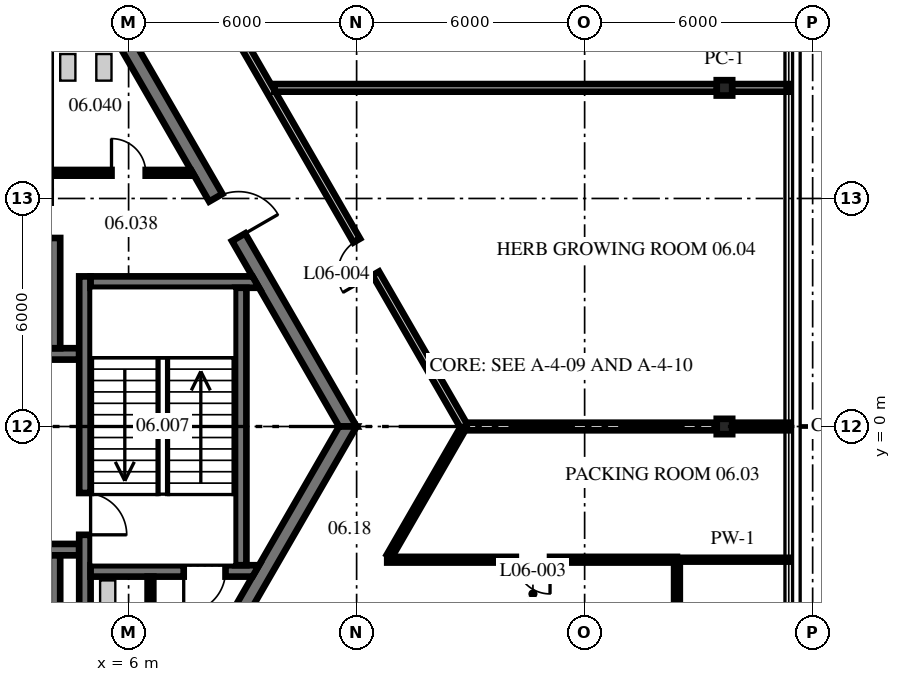
"""IFC4 building model, lengths in metres.
Left out: names, types, materials, properties, quantities, classifications, styles, units other than length and angle.
Written with IfcOpenShell. Run it as: python <this file> out.ifc"""

import sys

from ifc_helpers import new_model, si_unit, direction, frame, frame_2d, origin, origin_2d, place, context, subcontext, project, spatial, polyline, rectangle, i_section, outline, extrude, source, transform, mapped, element, fill, save


model = new_model("IFC4")
c1 = context("Model", 3, precision=1e-05, world=origin(), true_north=direction((0.0, 1.0)))
c2 = subcontext(c1, "Body", "Model", "MODEL_VIEW")
j1 = project(units=[si_unit("LENGTHUNIT", "METRE"), si_unit("PLANEANGLEUNIT", "RADIAN")], contexts=[c1])
p1 = place(None, origin())
s1 = spatial("IfcSite", under=j1, at=p1, CompositionType="ELEMENT")
p2 = place(p1, origin())
s2 = spatial("IfcBuilding", under=s1, at=p2, CompositionType="ELEMENT")
p3 = place(p2, frame((0.0, 0.0, 28.9)))
s3 = spatial("IfcBuildingStorey", under=s2, at=p3, CompositionType="ELEMENT", Elevation=28.9)
m1 = source(origin(), c2, "Body", "SweptSolid", [
    extrude(i_section(OverallWidth=0.404, OverallDepth=0.406, WebThickness=0.027, FlangeThickness=0.044, at=origin_2d()), origin(), (0.0, 0.0, 1.0), 4.3),
])
for number, where, z_axis, x_axis in (
    (1, (21.679, 0.0, 0.0), (0.0, 0.0, 1.0), (0.0, 1.0, 0.0)),
    (2, (21.679, 8.91, 0.0), (0.0, 0.0, 1.0), (0.0, 1.0, 0.0)),
):
    element("IfcColumn", number, at=place(p3, frame(where, z_axis=z_axis, x_axis=x_axis)), inside=s3, PredefinedType="COLUMN", context=c2, shape_type="MappedRepresentation", body=[
        mapped(m1, transform((0.0, 0.0, 0.0), scale=1.0)),
    ])
m2 = source(origin(), c2, "Body", "SweptSolid", [
    extrude(outline(polyline([(-0.115, -0.2), (11.885, -0.2), (11.654, 0.2), (0.115, 0.2), (-0.115, -0.2)])), origin(), (0.0, 0.0, 1.0), 4.1),
])
p4 = place(p3, frame((11.769, 0.0, 0.0), z_axis=(0.0, 0.0, 1.0), x_axis=(-0.499996592174, 0.866027371285, 0.0)))
e3 = element("IfcWall", 3, at=p4, inside=s3, PredefinedType="SHEAR", context=c2, shape_type="MappedRepresentation", body=[
    mapped(m2, transform((0.0, 0.0, 0.0), scale=1.0)),
])
p5 = place(p4, frame((5.75, 0.0, 0.0)))
e4 = element("IfcOpeningElement", 4, at=p5, cuts=e3, PredefinedType="OPENING", context=c2, shape_type="SweptSolid", body=[
    extrude(rectangle(XDim=1.2, YDim=2.1, at=frame_2d((0.6, 1.05))), frame((0.0, 0.21, 0.0), z_axis=(0.0, -1.0, 0.0), x_axis=(1.0, 0.0, 0.0)), (0.0, 0.0, 1.0), 0.42),
])
p6 = place(p3, frame((5.885, -10.192, 0.0), z_axis=(0.0, 0.0, 1.0), x_axis=(0.499996592174, 0.866027371285, 0.0)))
e5 = element("IfcWall", 5, at=p6, inside=s3, PredefinedType="SHEAR", context=c2, shape_type="MappedRepresentation", body=[
    mapped(m2, transform((0.0, 0.0, 0.0), scale=1.0)),
])
p7 = place(p6, frame((3.665, 0.0, 0.0)))
e6 = element("IfcOpeningElement", 6, at=p7, cuts=e5, PredefinedType="OPENING", context=c2, shape_type="SweptSolid", body=[
    extrude(rectangle(XDim=1.2, YDim=2.1, at=frame_2d((0.6, 1.05))), frame((0.0, 0.21, 0.0), z_axis=(0.0, -1.0, 0.0), x_axis=(1.0, 0.0, 0.0)), (0.0, 0.0, 1.0), 0.42),
])
m3 = source(origin(), c2, "Body", "SweptSolid", [
    extrude(rectangle(XDim=3.0, YDim=0.3, at=frame_2d((1.5, 0.0))), origin(), (0.0, 0.0, 1.0), 4.1),
])
p8 = place(p3, frame((1.7, 1.91, 0.0), z_axis=(0.0, 0.0, 1.0), x_axis=(1.0, 0.0, 0.0)))
e7 = element("IfcWall", 7, at=p8, inside=s3, PredefinedType="SHEAR", context=c2, shape_type="MappedRepresentation", body=[
    mapped(m3, transform((0.0, 0.0, 0.0), scale=1.0)),
])
p9 = place(p8, frame((0.55, 0.0, 0.0)))
e8 = element("IfcOpeningElement", 8, at=p9, cuts=e7, PredefinedType="OPENING", context=c2, shape_type="SweptSolid", body=[
    extrude(rectangle(XDim=1.1, YDim=2.1, at=frame_2d((0.55, 1.05))), frame((0.0, 0.16, 0.0), z_axis=(0.0, -1.0, 0.0), x_axis=(1.0, 0.0, 0.0)), (0.0, 0.0, 1.0), 0.32),
])
m4 = source(origin(), c2, "Body", "SweptSolid", [
    extrude(rectangle(XDim=2.9, YDim=0.3, at=frame_2d((1.45, 0.0))), origin(), (0.0, 0.0, 1.0), 4.1),
])
p10 = place(p3, frame((4.05, 2.06, 0.0), z_axis=(0.0, 0.0, 1.0), x_axis=(0.0, 1.0, 0.0)))
e9 = element("IfcWall", 9, at=p10, inside=s3, PredefinedType="SHEAR", context=c2, shape_type="MappedRepresentation", body=[
    mapped(m4, transform((0.0, 0.0, 0.0), scale=1.0)),
])
m5 = source(origin(), c2, "Body", "SweptSolid", [
    extrude(rectangle(XDim=12.8, YDim=0.3, at=frame_2d((6.4, 0.0))), origin(), (0.0, 0.0, 1.0), 4.1),
])
p11 = place(p3, frame((-8.1, -3.24, 0.0), z_axis=(0.0, 0.0, 1.0), x_axis=(1.0, 0.0, 0.0)))
e10 = element("IfcWall", 10, at=p11, inside=s3, PredefinedType="SHEAR", context=c2, shape_type="MappedRepresentation", body=[
    mapped(m5, transform((0.0, 0.0, 0.0), scale=1.0)),
])
p12 = place(p11, frame((0.913, 0.0, 0.0)))
e11 = element("IfcOpeningElement", 11, at=p12, cuts=e10, PredefinedType="OPENING", context=c2, shape_type="SweptSolid", body=[
    extrude(rectangle(XDim=0.9, YDim=2.1, at=frame_2d((0.45, 1.05))), frame((0.0, 0.16, 0.0), z_axis=(0.0, -1.0, 0.0), x_axis=(1.0, 0.0, 0.0)), (0.0, 0.0, 1.0), 0.32),
])
p13 = place(p11, frame((3.05, 0.0, 0.0)))
e12 = element("IfcOpeningElement", 12, at=p13, cuts=e10, PredefinedType="OPENING", context=c2, shape_type="SweptSolid", body=[
    extrude(rectangle(XDim=0.9, YDim=2.1, at=frame_2d((0.45, 1.05))), frame((0.0, 0.16, 0.0), z_axis=(0.0, -1.0, 0.0), x_axis=(1.0, 0.0, 0.0)), (0.0, 0.0, 1.0), 0.32),
])
p14 = place(p11, frame((6.587, 0.0, 0.0)))
e13 = element("IfcOpeningElement", 13, at=p14, cuts=e10, PredefinedType="OPENING", context=c2, shape_type="SweptSolid", body=[
    extrude(rectangle(XDim=0.9, YDim=2.1, at=frame_2d((0.45, 1.05))), frame((0.0, 0.16, 0.0), z_axis=(0.0, -1.0, 0.0), x_axis=(1.0, 0.0, 0.0)), (0.0, 0.0, 1.0), 0.32),
])
p15 = place(p11, frame((10.35, 0.0, 0.0)))
e14 = element("IfcOpeningElement", 14, at=p15, cuts=e10, PredefinedType="OPENING", context=c2, shape_type="SweptSolid", body=[
    extrude(rectangle(XDim=1.1, YDim=2.1, at=frame_2d((0.55, 1.05))), frame((0.0, 0.16, 0.0), z_axis=(0.0, -1.0, 0.0), x_axis=(1.0, 0.0, 0.0)), (0.0, 0.0, 1.0), 0.32),
])
m6 = source(origin(), c2, "Body", "SweptSolid", [
    extrude(rectangle(XDim=2.5, YDim=0.3, at=frame_2d((1.25, 0.0))), origin(), (0.0, 0.0, 1.0), 4.1),
])
p16 = place(p3, frame((4.05, -5.89, 0.0), z_axis=(0.0, 0.0, 1.0), x_axis=(0.0, 1.0, 0.0)))
e15 = element("IfcWall", 15, at=p16, inside=s3, PredefinedType="SHEAR", context=c2, shape_type="MappedRepresentation", body=[
    mapped(m6, transform((0.0, 0.0, 0.0), scale=1.0)),
])
m7 = source(origin(), c2, "Body", "SweptSolid", [
    extrude(outline(polyline([(-0.15, -0.15), (9.99, -0.15), (9.99, 0.15), (0.15, 0.15), (-0.15, -0.15)])), origin(), (0.0, 0.0, 1.0), 4.1),
])
p17 = place(p3, frame((4.85, -6.04, 0.0), z_axis=(0.0, 0.0, 1.0), x_axis=(0.0, 1.0, 0.0)))
e16 = element("IfcWall", 16, at=p17, inside=s3, PredefinedType="SHEAR", context=c2, shape_type="MappedRepresentation", body=[
    mapped(m7, transform((0.0, 0.0, 0.0), scale=1.0)),
])
p18 = place(p17, frame((3.19, 0.0, 0.0)))
e17 = element("IfcOpeningElement", 17, at=p18, cuts=e16, PredefinedType="OPENING", context=c2, shape_type="SweptSolid", body=[
    extrude(rectangle(XDim=1.1, YDim=2.1, at=frame_2d((0.55, 1.05))), frame((0.0, 0.16, 0.0), z_axis=(0.0, -1.0, 0.0), x_axis=(1.0, 0.0, 0.0)), (0.0, 0.0, 1.0), 0.32),
])
m8 = source(origin(), c2, "Body", "SweptSolid", [
    extrude(outline(polyline([(0.0, -0.15), (0.0, 0.15), (4.26, 0.15), (4.433, -0.15), (0.0, -0.15)])), origin(), (0.0, 0.0, 1.0), 4.1),
])
p19 = place(p3, frame((5.0, 3.8, 0.0), z_axis=(0.0, 0.0, 1.0), x_axis=(1.0, 0.0, 0.0)))
e18 = element("IfcWall", 18, at=p19, inside=s3, PredefinedType="SHEAR", context=c2, shape_type="MappedRepresentation", body=[
    mapped(m8, transform((0.0, 0.0, 0.0), scale=1.0)),
])
m9 = source(origin(), c2, "Body", "SweptSolid", [
    extrude(outline(polyline([(0.0, -0.15), (0.0, 0.15), (4.433, 0.15), (4.26, -0.15), (0.0, -0.15)])), origin(), (0.0, 0.0, 1.0), 4.1),
])
p20 = place(p3, frame((5.0, -3.8, 0.0), z_axis=(0.0, 0.0, 1.0), x_axis=(1.0, 0.0, 0.0)))
e19 = element("IfcWall", 19, at=p20, inside=s3, PredefinedType="SHEAR", context=c2, shape_type="MappedRepresentation", body=[
    mapped(m9, transform((0.0, 0.0, 0.0), scale=1.0)),
])
p21 = place(p20, frame((2.45, 0.0, 0.0)))
e20 = element("IfcOpeningElement", 20, at=p21, cuts=e19, PredefinedType="OPENING", context=c2, shape_type="SweptSolid", body=[
    extrude(rectangle(XDim=1.1, YDim=2.1, at=frame_2d((0.55, 1.05))), frame((0.0, 0.16, 0.0), z_axis=(0.0, -1.0, 0.0), x_axis=(1.0, 0.0, 0.0)), (0.0, 0.0, 1.0), 0.32),
])
m10 = source(origin(), c2, "Body", "SweptSolid", [
    extrude(rectangle(XDim=7.3, YDim=0.3, at=frame_2d((3.65, 0.0))), origin(), (0.0, 0.0, 1.0), 4.1),
])
p22 = place(p3, frame((8.95, -3.65, 0.0), z_axis=(0.0, 0.0, 1.0), x_axis=(0.0, 1.0, 0.0)))
e21 = element("IfcWall", 21, at=p22, inside=s3, PredefinedType="SHEAR", context=c2, shape_type="MappedRepresentation", body=[
    mapped(m10, transform((0.0, 0.0, 0.0), scale=1.0)),
])
m11 = source(origin(), c2, "Body", "SweptSolid", [
    extrude(outline(polyline([(0.0, -0.075), (0.0, 0.075), (3.693, 0.075), (3.78, -0.075), (0.0, -0.075)])), origin(), (0.0, 0.0, 1.0), 4.1),
])
p23 = place(p3, frame((3.95, 6.675, 0.0), z_axis=(0.0, 0.0, 1.0), x_axis=(1.0, 0.0, 0.0)))
e22 = element("IfcWall", 22, at=p23, inside=s3, PredefinedType="PARTITIONING", context=c2, shape_type="MappedRepresentation", body=[
    mapped(m11, transform((0.0, 0.0, 0.0), scale=1.0)),
])
p24 = place(p23, frame((1.6, 0.0, 0.0)))
e23 = element("IfcOpeningElement", 23, at=p24, cuts=e22, PredefinedType="OPENING", context=c2, shape_type="SweptSolid", body=[
    extrude(rectangle(XDim=0.9, YDim=2.1, at=frame_2d((0.45, 1.05))), frame((0.0, 0.085, 0.0), z_axis=(0.0, -1.0, 0.0), x_axis=(1.0, 0.0, 0.0)), (0.0, 0.0, 1.0), 0.17),
])
m12 = source(origin(), c2, "Body", "SweptSolid", [
    extrude(outline(polyline([(-0.075, -0.075), (2.24, -0.075), (2.24, 0.075), (0.075, 0.075), (-0.075, -0.075)])), origin(), (0.0, 0.0, 1.0), 4.1),
])
p25 = place(p3, frame((6.575, -6.19, 0.0), z_axis=(0.0, 0.0, 1.0), x_axis=(0.0, 1.0, 0.0)))
e24 = element("IfcWall", 24, at=p25, inside=s3, PredefinedType="PARTITIONING", context=c2, shape_type="MappedRepresentation", body=[
    mapped(m12, transform((0.0, 0.0, 0.0), scale=1.0)),
])
m13 = source(origin(), c2, "Body", "SweptSolid", [
    extrude(rectangle(XDim=14.759, YDim=0.2, at=frame_2d((7.379, 0.0))), origin(), (0.0, 0.0, 1.0), 4.1),
])
p26 = place(p3, frame((7.449, 12.782, 0.0), z_axis=(0.0, 0.0, 1.0), x_axis=(0.500005012202, -0.866022509969, 0.0)))
e25 = element("IfcWall", 25, at=p26, inside=s3, PredefinedType="PARTITIONING", context=c2, shape_type="MappedRepresentation", body=[
    mapped(m13, transform((0.0, 0.0, 0.0), scale=1.0)),
])
p27 = place(p26, frame((9.109, 0.0, 0.0)))
e26 = element("IfcOpeningElement", 26, at=p27, cuts=e25, PredefinedType="OPENING", context=c2, shape_type="SweptSolid", body=[
    extrude(rectangle(XDim=1.0, YDim=2.1, at=frame_2d((0.5, 1.05))), frame((0.0, 0.11, 0.0), z_axis=(0.0, -1.0, 0.0), x_axis=(1.0, 0.0, 0.0)), (0.0, 0.0, 1.0), 0.22),
])
p28 = place(p26, frame((1.721, 0.0, 0.0)))
e27 = element("IfcOpeningElement", 27, at=p28, cuts=e25, PredefinedType="OPENING", context=c2, shape_type="SweptSolid", body=[
    extrude(rectangle(XDim=1.0, YDim=2.1, at=frame_2d((0.5, 1.05))), frame((0.0, 0.11, 0.0), z_axis=(0.0, -1.0, 0.0), x_axis=(1.0, 0.0, 0.0)), (0.0, 0.0, 1.0), 0.22),
])
m14 = source(origin(), c2, "Body", "SweptSolid", [
    extrude(rectangle(XDim=7.624, YDim=0.15, at=frame_2d((3.812, 0.0))), origin(), (0.0, 0.0, 1.0), 4.1),
])
p29 = place(p3, frame((12.805, -3.505, 0.0), z_axis=(0.0, 0.0, 1.0), x_axis=(1.0, 0.0, 0.0)))
e28 = element("IfcWall", 28, at=p29, inside=s3, PredefinedType="PARTITIONING", context=c2, shape_type="MappedRepresentation", body=[
    mapped(m14, transform((0.0, 0.0, 0.0), scale=1.0)),
])
p30 = place(p29, frame((3.384, 0.0, 0.0)))
e29 = element("IfcOpeningElement", 29, at=p30, cuts=e28, PredefinedType="OPENING", context=c2, shape_type="SweptSolid", body=[
    extrude(rectangle(XDim=0.9, YDim=2.1, at=frame_2d((0.45, 1.05))), frame((0.0, 0.085, 0.0), z_axis=(0.0, -1.0, 0.0), x_axis=(1.0, 0.0, 0.0)), (0.0, 0.0, 1.0), 0.17),
])
m15 = source(origin(), c2, "Body", "SweptSolid", [
    extrude(rectangle(XDim=2.942, YDim=0.1, at=frame_2d((1.471, 0.0))), origin(), (0.0, 0.0, 1.0), 4.1),
])
p31 = place(p3, frame((20.429, -3.505, 0.0), z_axis=(0.0, 0.0, 1.0), x_axis=(1.0, 0.0, 0.0)))
e30 = element("IfcWall", 30, at=p31, inside=s3, PredefinedType="PARTITIONING", context=c2, shape_type="MappedRepresentation", body=[
    mapped(m15, transform((0.0, 0.0, 0.0), scale=1.0)),
])
m16 = source(origin(), c2, "Body", "SweptSolid", [
    extrude(rectangle(XDim=6.587, YDim=0.2, at=frame_2d((3.294, 0.0))), origin(), (0.0, 0.0, 1.0), 3.488),
])
p32 = place(p3, frame((14.899, 0.0, 0.0), z_axis=(0.0, 0.0, 1.0), x_axis=(1.0, 0.0, 0.0)))
e31 = element("IfcWall", 31, at=p32, inside=s3, PredefinedType="PARTITIONING", context=c2, shape_type="MappedRepresentation", body=[
    mapped(m16, transform((0.0, 0.0, 0.0), scale=1.0)),
])
m17 = source(origin(), c2, "Body", "SweptSolid", [
    extrude(rectangle(XDim=1.499, YDim=0.2, at=frame_2d((0.749, 0.0))), origin(), (0.0, 0.0, 1.0), 4.1),
])
p33 = place(p3, frame((21.873, 0.0, 0.0), z_axis=(0.0, 0.0, 1.0), x_axis=(1.0, 0.0, 0.0)))
e32 = element("IfcWall", 32, at=p33, inside=s3, PredefinedType="PARTITIONING", context=c2, shape_type="MappedRepresentation", body=[
    mapped(m17, transform((0.0, 0.0, 0.0), scale=1.0)),
])
m18 = source(origin(), c2, "Body", "SweptSolid", [
    extrude(rectangle(XDim=11.652, YDim=0.2, at=frame_2d((5.826, 0.0))), origin(), (0.0, 0.0, 1.0), 3.343),
])
p34 = place(p3, frame((9.835, 8.91, 0.0), z_axis=(0.0, 0.0, 1.0), x_axis=(1.0, 0.0, 0.0)))
e33 = element("IfcWall", 33, at=p34, inside=s3, PredefinedType="PARTITIONING", context=c2, shape_type="MappedRepresentation", body=[
    mapped(m18, transform((0.0, 0.0, 0.0), scale=1.0)),
])
p35 = place(p3, frame((21.873, 8.91, 0.0), z_axis=(0.0, 0.0, 1.0), x_axis=(1.0, 0.0, 0.0)))
e34 = element("IfcWall", 34, at=p35, inside=s3, PredefinedType="PARTITIONING", context=c2, shape_type="MappedRepresentation", body=[
    mapped(m17, transform((0.0, 0.0, 0.0), scale=1.0)),
])
m19 = source(origin(), c2, "Body", "SweptSolid", [
    extrude(rectangle(XDim=3.867, YDim=0.15, at=frame_2d((1.934, 0.0))), origin(), (0.0, 0.0, 1.0), 4.1),
])
p36 = place(p3, frame((12.86, -3.41, 0.0), z_axis=(0.0, 0.0, 1.0), x_axis=(0.499995691662, 0.86602789119, 0.0)))
e35 = element("IfcWall", 35, at=p36, inside=s3, PredefinedType="PARTITIONING", context=c2, shape_type="MappedRepresentation", body=[
    mapped(m19, transform((0.0, 0.0, 0.0), scale=1.0)),
])
m20 = source(origin(), c2, "Body", "SweptSolid", [
    extrude(rectangle(XDim=1.78, YDim=0.15, at=frame_2d((0.89, 0.0))), origin(), (0.0, 0.0, 1.0), 4.1),
])
p37 = place(p3, frame((20.429, -5.345, 0.0), z_axis=(0.0, 0.0, 1.0), x_axis=(0.0, 1.0, 0.0)))
e36 = element("IfcWall", 36, at=p37, inside=s3, PredefinedType="PARTITIONING", context=c2, shape_type="MappedRepresentation", body=[
    mapped(m20, transform((0.0, 0.0, 0.0), scale=1.0)),
])
p38 = place(p5, frame((1.2, 0.0, 0.0), z_axis=(0.0, 0.0, 1.0), x_axis=(-1.0, 0.0, 0.0)))
e37 = element("IfcDoor", 37, at=p38, inside=s3, OperationType="SINGLE_SWING_RIGHT", PredefinedType="DOOR", context=c2, shape_type="SweptSolid", body=[
    extrude(rectangle(XDim=1.2, YDim=2.1, at=frame_2d((0.6, 1.05))), frame((0.0, 0.025, 0.0), z_axis=(0.0, -1.0, 0.0), x_axis=(1.0, 0.0, 0.0)), (0.0, 0.0, 1.0), 0.05),
])
fill(e4, e37)
p39 = place(p18, frame((1.1, 0.0, 0.0), z_axis=(0.0, 0.0, 1.0), x_axis=(-1.0, 0.0, 0.0)))
e38 = element("IfcDoor", 38, at=p39, inside=s3, OperationType="SINGLE_SWING_RIGHT", PredefinedType="DOOR", context=c2, shape_type="SweptSolid", body=[
    extrude(rectangle(XDim=1.1, YDim=2.1, at=frame_2d((0.55, 1.05))), frame((0.0, 0.025, 0.0), z_axis=(0.0, -1.0, 0.0), x_axis=(1.0, 0.0, 0.0)), (0.0, 0.0, 1.0), 0.05),
])
fill(e17, e38)
p40 = place(p21, frame((1.1, 0.0, 0.0), z_axis=(0.0, 0.0, 1.0), x_axis=(-1.0, 0.0, 0.0)))
e39 = element("IfcDoor", 39, at=p40, inside=s3, OperationType="SINGLE_SWING_RIGHT", PredefinedType="DOOR", context=c2, shape_type="SweptSolid", body=[
    extrude(rectangle(XDim=1.1, YDim=2.1, at=frame_2d((0.55, 1.05))), frame((0.0, 0.025, 0.0), z_axis=(0.0, -1.0, 0.0), x_axis=(1.0, 0.0, 0.0)), (0.0, 0.0, 1.0), 0.05),
])
fill(e20, e39)
p41 = place(p24, origin())
e40 = element("IfcDoor", 40, at=p41, inside=s3, OperationType="SINGLE_SWING_LEFT", PredefinedType="DOOR", context=c2, shape_type="SweptSolid", body=[
    extrude(rectangle(XDim=0.9, YDim=2.1, at=frame_2d((0.45, 1.05))), frame((0.0, 0.025, 0.0), z_axis=(0.0, -1.0, 0.0), x_axis=(1.0, 0.0, 0.0)), (0.0, 0.0, 1.0), 0.05),
])
fill(e23, e40)
p42 = place(p30, origin())
e41 = element("IfcDoor", 41, at=p42, inside=s3, OperationType="SINGLE_SWING_RIGHT", PredefinedType="DOOR", context=c2, shape_type="SweptSolid", body=[
    extrude(rectangle(XDim=0.9, YDim=2.1, at=frame_2d((0.45, 1.05))), frame((0.0, 0.025, 0.0), z_axis=(0.0, -1.0, 0.0), x_axis=(1.0, 0.0, 0.0)), (0.0, 0.0, 1.0), 0.05),
])
fill(e29, e41)
p43 = place(p27, origin())
e42 = element("IfcDoor", 42, at=p43, inside=s3, OperationType="SINGLE_SWING_RIGHT", PredefinedType="DOOR", context=c2, shape_type="SweptSolid", body=[
    extrude(rectangle(XDim=1.0, YDim=2.1, at=frame_2d((0.5, 1.05))), frame((0.0, 0.025, 0.0), z_axis=(0.0, -1.0, 0.0), x_axis=(1.0, 0.0, 0.0)), (0.0, 0.0, 1.0), 0.05),
])
fill(e26, e42)
save(model, sys.argv[1])
